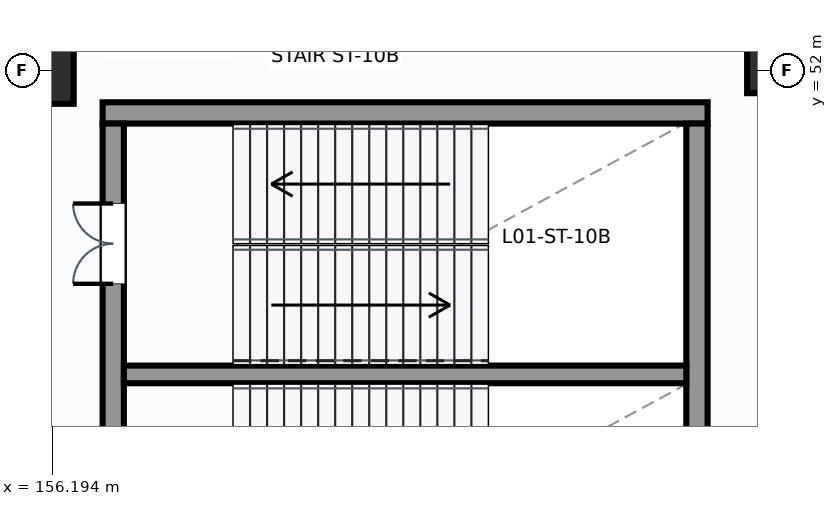
"""IFC4 building model, lengths in metres.
Left out: names, types, materials, properties, quantities, classifications, styles, units other than length and angle.
Written with IfcOpenShell. Run it as: python <this file> out.ifc"""

import sys

from ifc_helpers import new_model, si_unit, direction, frame, frame_2d, origin, origin_2d, place, context, subcontext, project, spatial, rectangle, extrude, element, fill, save


model = new_model("IFC4")
c1 = context("Model", 3, precision=1e-05, world=origin(), true_north=direction((0.0, 1.0)))
c2 = subcontext(c1, "Body", "Model", "MODEL_VIEW")
j1 = project(units=[si_unit("LENGTHUNIT", "METRE"), si_unit("PLANEANGLEUNIT", "RADIAN")], contexts=[c1])
p1 = place(None, origin())
s1 = spatial("IfcSite", under=j1, at=p1, CompositionType="ELEMENT")
p2 = place(p1, origin())
s2 = spatial("IfcBuilding", under=s1, at=p2, CompositionType="ELEMENT")
p3 = place(p2, frame((0.0, 0.0, 5.4)))
s3 = spatial("IfcBuildingStorey", under=s2, at=p3, CompositionType="ELEMENT", Elevation=5.4)
p4 = place(p3, frame((156.0, 52.0, 0.0), z_axis=(0.0, 0.0, 1.0), x_axis=(1.0, 0.0, 0.0)))
e1 = element("IfcColumn", 1, at=p4, inside=s3, PredefinedType="COLUMN", context=c2, shape_type="SweptSolid", body=[
    extrude(rectangle(XDim=1.1, YDim=1.1, at=origin_2d()), origin(), (0.0, 0.0, 1.0), 4.8),
])
p5 = place(p3, frame((168.0, 52.0, 0.0), z_axis=(0.0, 0.0, 1.0), x_axis=(1.0, 0.0, 0.0)))
e2 = element("IfcColumn", 2, at=p5, inside=s3, PredefinedType="COLUMN", context=c2, shape_type="SweptSolid", body=[
    extrude(rectangle(XDim=0.75, YDim=0.75, at=origin_2d()), origin(), (0.0, 0.0, 1.0), 4.8),
])
p6 = place(p3, frame((157.025, 51.3, 0.0), z_axis=(0.0, 0.0, 1.0), x_axis=(1.0, 0.0, 0.0)))
e3 = element("IfcWall", 3, at=p6, inside=s3, PredefinedType="SHEAR", context=c2, shape_type="SweptSolid", body=[
    extrude(rectangle(XDim=9.95, YDim=0.35, at=frame_2d((4.975, 0.0))), origin(), (0.0, 0.0, 1.0), 4.8),
])
p7 = place(p3, frame((157.2, 42.875, 0.0), z_axis=(0.0, 0.0, 1.0), x_axis=(0.0, 1.0, 0.0)))
e4 = element("IfcWall", 4, at=p7, inside=s3, PredefinedType="SHEAR", context=c2, shape_type="SweptSolid", body=[
    extrude(rectangle(XDim=8.25, YDim=0.35, at=frame_2d((4.125, 0.0))), origin(), (0.0, 0.0, 1.0), 4.8),
])
p8 = place(p7, frame((1.275, 0.0, 0.0)))
e5 = element("IfcOpeningElement", 5, at=p8, cuts=e4, PredefinedType="OPENING", context=c2, shape_type="SweptSolid", body=[
    extrude(rectangle(XDim=1.4, YDim=2.2, at=frame_2d((0.7, 1.1))), frame((0.0, 0.185, 0.0), z_axis=(0.0, -1.0, 0.0), x_axis=(1.0, 0.0, 0.0)), (0.0, 0.0, 1.0), 0.37),
])
p9 = place(p7, frame((5.615, 0.0, 0.0)))
e6 = element("IfcOpeningElement", 6, at=p9, cuts=e4, PredefinedType="OPENING", context=c2, shape_type="SweptSolid", body=[
    extrude(rectangle(XDim=1.32, YDim=2.2, at=frame_2d((0.66, 1.1))), frame((0.0, 0.185, 0.0), z_axis=(0.0, -1.0, 0.0), x_axis=(1.0, 0.0, 0.0)), (0.0, 0.0, 1.0), 0.37),
])
p10 = place(p3, frame((166.8, 42.875, 0.0), z_axis=(0.0, 0.0, 1.0), x_axis=(0.0, 1.0, 0.0)))
e7 = element("IfcWall", 7, at=p10, inside=s3, PredefinedType="SHEAR", context=c2, shape_type="SweptSolid", body=[
    extrude(rectangle(XDim=8.25, YDim=0.35, at=frame_2d((4.125, 0.0))), origin(), (0.0, 0.0, 1.0), 4.8),
])
p11 = place(p3, frame((157.375, 47.0, 0.0), z_axis=(0.0, 0.0, 1.0), x_axis=(1.0, 0.0, 0.0)))
e8 = element("IfcWall", 8, at=p11, inside=s3, PredefinedType="SHEAR", context=c2, shape_type="SweptSolid", body=[
    extrude(rectangle(XDim=9.25, YDim=0.29, at=frame_2d((4.625, 0.0))), origin(), (0.0, 0.0, 1.0), 4.8),
])
p12 = place(p9, origin())
e9 = element("IfcDoor", 9, at=p12, inside=s3, OperationType="DOUBLE_DOOR_SINGLE_SWING", PredefinedType="DOOR", context=c2, shape_type="SweptSolid", body=[
    extrude(rectangle(XDim=1.32, YDim=2.2, at=frame_2d((0.66, 1.1))), frame((0.0, 0.025, 0.0), z_axis=(0.0, -1.0, 0.0), x_axis=(1.0, 0.0, 0.0)), (0.0, 0.0, 1.0), 0.05),
])
fill(e6, e9)
save(model, sys.argv[1])
